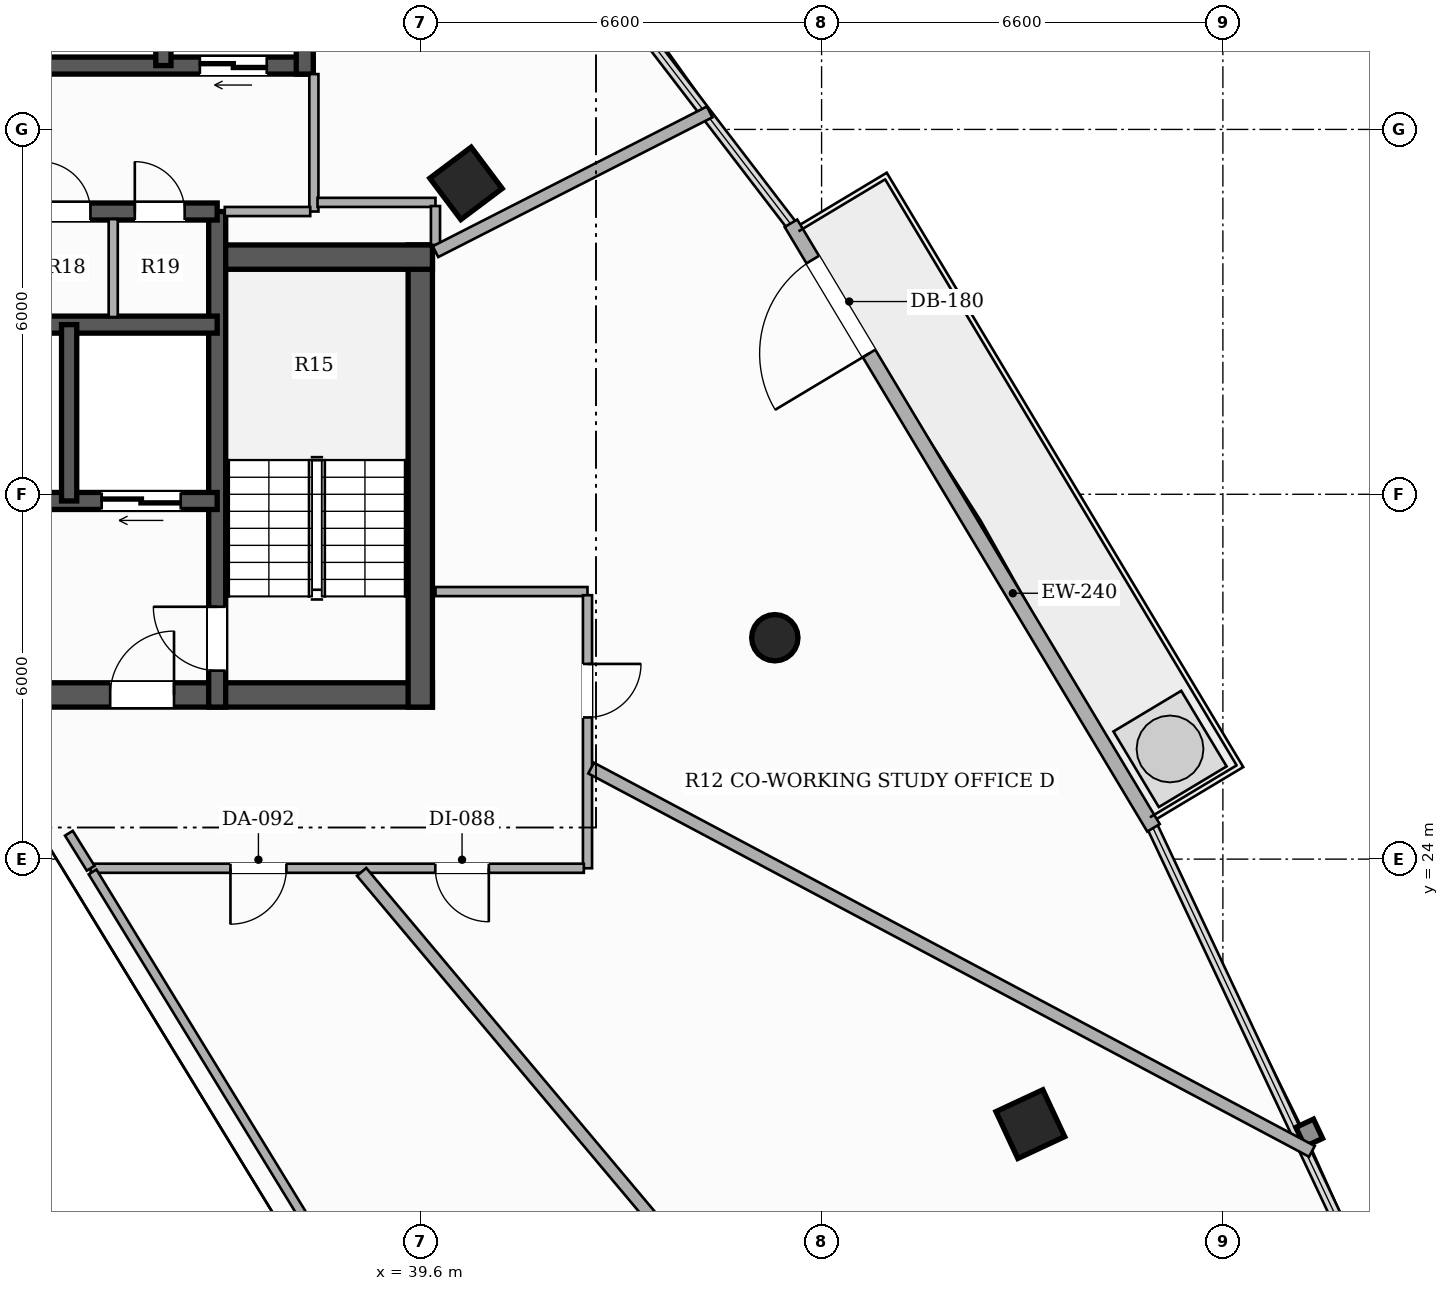
"""IFC4 building model, lengths in metres.
Left out: names, types, materials, properties, quantities, classifications, styles, units other than length and angle.
Written with IfcOpenShell. Run it as: python <this file> out.ifc"""

import sys

from ifc_helpers import new_model, si_unit, direction, frame, frame_2d, origin, origin_2d, place, context, subcontext, project, spatial, rectangle, hollow_rectangle, hollow_circle, extrude, element, fill, save


model = new_model("IFC4")
c1 = context("Model", 3, precision=1e-05, world=origin(), true_north=direction((0.0, 1.0)))
c2 = subcontext(c1, "Body", "Model", "MODEL_VIEW")
j1 = project(units=[si_unit("LENGTHUNIT", "METRE"), si_unit("PLANEANGLEUNIT", "RADIAN")], contexts=[c1])
p1 = place(None, origin())
s1 = spatial("IfcSite", under=j1, at=p1, CompositionType="ELEMENT")
p2 = place(p1, origin())
s2 = spatial("IfcBuilding", under=s1, at=p2, CompositionType="ELEMENT")
p3 = place(p2, frame((0.0, 0.0, 133.1)))
s3 = spatial("IfcBuildingStorey", under=s2, at=p3, CompositionType="ELEMENT", Elevation=133.1)
p4 = place(p3, frame((26.2, 26.7, 0.0), z_axis=(0.0, 0.0, 1.0), x_axis=(1.0, 0.0, 0.0)))
e1 = element("IfcWall", 1, at=p4, inside=s3, PredefinedType="SHEAR", context=c2, shape_type="SweptSolid", body=[
    extrude(rectangle(XDim=13.6, YDim=0.4, at=frame_2d((6.8, 0.0))), origin(), (0.0, 0.0, 1.0), 3.3),
])
p5 = place(p4, frame((4.35, 0.0, 0.0)))
e2 = element("IfcOpeningElement", 2, at=p5, cuts=e1, PredefinedType="OPENING", context=c2, shape_type="SweptSolid", body=[
    extrude(rectangle(XDim=1.05, YDim=2.15, at=frame_2d((0.525, 1.075))), frame((0.0, 0.21, 0.0), z_axis=(0.0, -1.0, 0.0), x_axis=(1.0, 0.0, 0.0)), (0.0, 0.0, 1.0), 0.42),
])
p6 = place(p4, frame((8.3, 0.0, 0.0)))
e3 = element("IfcOpeningElement", 3, at=p6, cuts=e1, PredefinedType="OPENING", context=c2, shape_type="SweptSolid", body=[
    extrude(rectangle(XDim=1.05, YDim=2.15, at=frame_2d((0.525, 1.075))), frame((0.0, 0.21, 0.0), z_axis=(0.0, -1.0, 0.0), x_axis=(1.0, 0.0, 0.0)), (0.0, 0.0, 1.0), 0.42),
])
p7 = place(p3, frame((39.6, 26.5, 0.0), z_axis=(0.0, 0.0, 1.0), x_axis=(0.0, 1.0, 0.0)))
e4 = element("IfcWall", 4, at=p7, inside=s3, PredefinedType="SHEAR", context=c2, shape_type="SweptSolid", body=[
    extrude(rectangle(XDim=7.6, YDim=0.4, at=frame_2d((3.8, 0.0))), origin(), (0.0, 0.0, 1.0), 3.3),
])
p8 = place(p3, frame((36.12, 33.9, 0.0), z_axis=(0.0, 0.0, 1.0), x_axis=(1.0, 0.0, 0.0)))
e5 = element("IfcWall", 5, at=p8, inside=s3, PredefinedType="SHEAR", context=c2, shape_type="SweptSolid", body=[
    extrude(rectangle(XDim=3.68, YDim=0.4, at=frame_2d((1.84, 0.0))), origin(), (0.0, 0.0, 1.0), 3.3),
])
p9 = place(p3, frame((36.26, 26.5, 0.0), z_axis=(0.0, 0.0, 1.0), x_axis=(0.0, 1.0, 0.0)))
e6 = element("IfcWall", 6, at=p9, inside=s3, PredefinedType="SHEAR", context=c2, shape_type="SweptSolid", body=[
    extrude(rectangle(XDim=8.15, YDim=0.28, at=frame_2d((4.075, 0.0))), origin(), (0.0, 0.0, 1.0), 3.3),
])
p10 = place(p9, frame((0.6, 0.0, 0.0)))
e7 = element("IfcOpeningElement", 7, at=p10, cuts=e6, PredefinedType="OPENING", context=c2, shape_type="SweptSolid", body=[
    extrude(rectangle(XDim=1.05, YDim=2.15, at=frame_2d((0.525, 1.075))), frame((0.0, 0.15, 0.0), z_axis=(0.0, -1.0, 0.0), x_axis=(1.0, 0.0, 0.0)), (0.0, 0.0, 1.0), 0.3),
])
p11 = place(p3, frame((36.26, 29.89, 0.0), z_axis=(0.0, 0.0, 1.0), x_axis=(-1.0, 0.0, 0.0)))
e8 = element("IfcWall", 8, at=p11, inside=s3, PredefinedType="SHEAR", context=c2, shape_type="SweptSolid", body=[
    extrude(rectangle(XDim=6.52, YDim=0.28, at=frame_2d((3.26, 0.0))), origin(), (0.0, 0.0, 1.0), 3.3),
])
p12 = place(p11, frame((4.875, 0.0, 0.0)))
e9 = element("IfcOpeningElement", 9, at=p12, cuts=e8, PredefinedType="OPENING", context=c2, shape_type="SweptSolid", body=[
    extrude(rectangle(XDim=1.1, YDim=2.2, at=frame_2d((0.55, 1.1))), frame((0.0, 0.15, 0.0), z_axis=(0.0, -1.0, 0.0), x_axis=(1.0, 0.0, 0.0)), (0.0, 0.0, 1.0), 0.3),
])
p13 = place(p11, frame((2.875, 0.0, 0.0)))
e10 = element("IfcOpeningElement", 10, at=p13, cuts=e8, PredefinedType="OPENING", context=c2, shape_type="SweptSolid", body=[
    extrude(rectangle(XDim=1.1, YDim=2.2, at=frame_2d((0.55, 1.1))), frame((0.0, 0.15, 0.0), z_axis=(0.0, -1.0, 0.0), x_axis=(1.0, 0.0, 0.0)), (0.0, 0.0, 1.0), 0.3),
])
p14 = place(p11, frame((0.6, 0.0, 0.0)))
e11 = element("IfcOpeningElement", 11, at=p14, cuts=e8, PredefinedType="OPENING", context=c2, shape_type="SweptSolid", body=[
    extrude(rectangle(XDim=1.3, YDim=2.2, at=frame_2d((0.65, 1.1))), frame((0.0, 0.15, 0.0), z_axis=(0.0, -1.0, 0.0), x_axis=(1.0, 0.0, 0.0)), (0.0, 0.0, 1.0), 0.3),
])
p15 = place(p3, frame((29.74, 32.79, 0.0), z_axis=(0.0, 0.0, 1.0), x_axis=(1.0, 0.0, 0.0)))
e12 = element("IfcWall", 12, at=p15, inside=s3, PredefinedType="SHEAR", context=c2, shape_type="SweptSolid", body=[
    extrude(rectangle(XDim=6.52, YDim=0.28, at=frame_2d((3.26, 0.0))), origin(), (0.0, 0.0, 1.0), 3.3),
])
p16 = place(p3, frame((33.825, 29.89, 0.0), z_axis=(0.0, 0.0, 1.0), x_axis=(0.0, 1.0, 0.0)))
e13 = element("IfcWall", 13, at=p16, inside=s3, PredefinedType="SHEAR", context=c2, shape_type="SweptSolid", body=[
    extrude(rectangle(XDim=2.9, YDim=0.25, at=frame_2d((1.45, 0.0))), origin(), (0.0, 0.0, 1.0), 3.3),
])
p17 = place(p3, frame((29.74, 34.65, 0.0), z_axis=(0.0, 0.0, 1.0), x_axis=(1.0, 0.0, 0.0)))
e14 = element("IfcWall", 14, at=p17, inside=s3, PredefinedType="SHEAR", context=c2, shape_type="SweptSolid", body=[
    extrude(rectangle(XDim=6.52, YDim=0.28, at=frame_2d((3.26, 0.0))), origin(), (0.0, 0.0, 1.0), 3.3),
])
p18 = place(p17, frame((0.515, 0.0, 0.0)))
e15 = element("IfcOpeningElement", 15, at=p18, cuts=e14, PredefinedType="OPENING", context=c2, shape_type="SweptSolid", body=[
    extrude(rectangle(XDim=0.82, YDim=2.1, at=frame_2d((0.41, 1.05))), frame((0.0, 0.15, 0.0), z_axis=(0.0, -1.0, 0.0), x_axis=(1.0, 0.0, 0.0)), (0.0, 0.0, 1.0), 0.3),
])
p19 = place(p17, frame((2.065, 0.0, 0.0)))
e16 = element("IfcOpeningElement", 16, at=p19, cuts=e14, PredefinedType="OPENING", context=c2, shape_type="SweptSolid", body=[
    extrude(rectangle(XDim=0.82, YDim=2.1, at=frame_2d((0.41, 1.05))), frame((0.0, 0.15, 0.0), z_axis=(0.0, -1.0, 0.0), x_axis=(1.0, 0.0, 0.0)), (0.0, 0.0, 1.0), 0.3),
])
p20 = place(p17, frame((3.615, 0.0, 0.0)))
e17 = element("IfcOpeningElement", 17, at=p20, cuts=e14, PredefinedType="OPENING", context=c2, shape_type="SweptSolid", body=[
    extrude(rectangle(XDim=0.82, YDim=2.1, at=frame_2d((0.41, 1.05))), frame((0.0, 0.15, 0.0), z_axis=(0.0, -1.0, 0.0), x_axis=(1.0, 0.0, 0.0)), (0.0, 0.0, 1.0), 0.3),
])
p21 = place(p17, frame((5.165, 0.0, 0.0)))
e18 = element("IfcOpeningElement", 18, at=p21, cuts=e14, PredefinedType="OPENING", context=c2, shape_type="SweptSolid", body=[
    extrude(rectangle(XDim=0.82, YDim=2.1, at=frame_2d((0.41, 1.05))), frame((0.0, 0.15, 0.0), z_axis=(0.0, -1.0, 0.0), x_axis=(1.0, 0.0, 0.0)), (0.0, 0.0, 1.0), 0.3),
])
p22 = place(p3, frame((37.84, 37.05, 0.0), z_axis=(0.0, 0.0, 1.0), x_axis=(-1.0, 0.0, 0.0)))
e19 = element("IfcWall", 19, at=p22, inside=s3, PredefinedType="SHEAR", context=c2, shape_type="SweptSolid", body=[
    extrude(rectangle(XDim=9.68, YDim=0.28, at=frame_2d((4.84, 0.0))), origin(), (0.0, 0.0, 1.0), 3.3),
])
p23 = place(p22, frame((7.815, 0.0, 0.0)))
e20 = element("IfcOpeningElement", 20, at=p23, cuts=e19, PredefinedType="OPENING", context=c2, shape_type="SweptSolid", body=[
    extrude(rectangle(XDim=1.1, YDim=2.2, at=frame_2d((0.55, 1.1))), frame((0.0, 0.15, 0.0), z_axis=(0.0, -1.0, 0.0), x_axis=(1.0, 0.0, 0.0)), (0.0, 0.0, 1.0), 0.3),
])
p24 = place(p22, frame((0.765, 0.0, 0.0)))
e21 = element("IfcOpeningElement", 21, at=p24, cuts=e19, PredefinedType="OPENING", context=c2, shape_type="SweptSolid", body=[
    extrude(rectangle(XDim=1.1, YDim=2.2, at=frame_2d((0.55, 1.1))), frame((0.0, 0.15, 0.0), z_axis=(0.0, -1.0, 0.0), x_axis=(1.0, 0.0, 0.0)), (0.0, 0.0, 1.0), 0.3),
])
p25 = place(p3, frame((37.7, 36.91, 0.0), z_axis=(0.0, 0.0, 1.0), x_axis=(0.0, 1.0, 0.0)))
e22 = element("IfcWall", 22, at=p25, inside=s3, PredefinedType="SHEAR", context=c2, shape_type="SweptSolid", body=[
    extrude(rectangle(XDim=2.83, YDim=0.28, at=frame_2d((1.415, 0.0))), origin(), (0.0, 0.0, 1.0), 3.3),
])
p26 = place(p3, frame((35.375, 37.05, 0.0), z_axis=(0.0, 0.0, 1.0), x_axis=(0.0, 1.0, 0.0)))
e23 = element("IfcWall", 23, at=p26, inside=s3, PredefinedType="SHEAR", context=c2, shape_type="SweptSolid", body=[
    extrude(rectangle(XDim=2.55, YDim=0.25, at=frame_2d((1.275, 0.0))), origin(), (0.0, 0.0, 1.0), 3.3),
])
p27 = place(p3, frame((49.633, 19.642, 0.0), z_axis=(0.0, 0.0, 1.0), x_axis=(-0.422618261741, 0.906307787037, 0.0)))
e24 = element("IfcColumn", 24, at=p27, inside=s3, PredefinedType="COLUMN", context=c2, shape_type="SweptSolid", body=[
    extrude(hollow_rectangle(XDim=0.85, YDim=0.85, WallThickness=0.028, at=origin_2d()), origin(), (0.0, 0.0, 1.0), 3.3),
])
p28 = place(p3, frame((45.431, 27.641, 0.0), z_axis=(0.0, 0.0, 1.0), x_axis=(1.0, 0.0, 0.0)))
e25 = element("IfcColumn", 25, at=p28, inside=s3, PredefinedType="COLUMN", context=c2, shape_type="SweptSolid", body=[
    extrude(hollow_circle(Radius=0.381, WallThickness=0.022, at=origin_2d()), origin(), (0.0, 0.0, 1.0), 3.3),
])
p29 = place(p3, frame((40.352, 35.113, 0.0), z_axis=(0.0, 0.0, 1.0), x_axis=(-0.600420225326, 0.799684658487, 0.0)))
e26 = element("IfcColumn", 26, at=p29, inside=s3, PredefinedType="COLUMN", context=c2, shape_type="SweptSolid", body=[
    extrude(hollow_rectangle(XDim=0.85, YDim=0.85, WallThickness=0.028, at=origin_2d()), origin(), (0.0, 0.0, 1.0), 3.3),
])
p30 = place(p3, frame((51.659, 24.515, 0.0), z_axis=(0.0, 0.0, 1.0), x_axis=(-0.514343998995, 0.857583961311, 0.0)))
e27 = element("IfcWall", 27, at=p30, inside=s3, PredefinedType="SOLIDWALL", context=c2, shape_type="SweptSolid", body=[
    extrude(rectangle(XDim=11.593, YDim=0.24, at=frame_2d((5.797, 0.0))), origin(), (0.0, 0.0, 1.0), 2.624),
])
p31 = place(p30, frame((9.096, 0.0, 0.0)))
e28 = element("IfcOpeningElement", 28, at=p31, cuts=e27, PredefinedType="OPENING", context=c2, shape_type="SweptSolid", body=[
    extrude(rectangle(XDim=1.8, YDim=2.2, at=frame_2d((0.9, 1.1))), frame((0.0, 0.13, 0.0), z_axis=(0.0, -1.0, 0.0), x_axis=(1.0, 0.0, 0.0)), (0.0, 0.0, 1.0), 0.26),
])
p32 = place(p3, frame((37.85, 34.65, 0.0), z_axis=(0.0, 0.0, 1.0), x_axis=(0.0, 1.0, 0.0)))
e29 = element("IfcWall", 29, at=p32, inside=s3, PredefinedType="PARTITIONING", context=c2, shape_type="SweptSolid", body=[
    extrude(rectangle(XDim=2.26, YDim=0.15, at=frame_2d((1.13, 0.0))), origin(), (0.0, 0.0, 1.0), 3.06),
])
p33 = place(p3, frame((36.385, 34.65, 0.0), z_axis=(0.0, 0.0, 1.0), x_axis=(1.0, 0.0, 0.0)))
e30 = element("IfcWall", 30, at=p33, inside=s3, PredefinedType="PARTITIONING", context=c2, shape_type="SweptSolid", body=[
    extrude(rectangle(XDim=1.405, YDim=0.15, at=frame_2d((0.703, 0.0))), origin(), (0.0, 0.0, 1.0), 2.425),
])
p34 = place(p3, frame((34.55, 32.915, 0.0), z_axis=(0.0, 0.0, 1.0), x_axis=(0.0, 1.0, 0.0)))
e31 = element("IfcWall", 31, at=p34, inside=s3, PredefinedType="PARTITIONING", context=c2, shape_type="SweptSolid", body=[
    extrude(rectangle(XDim=1.61, YDim=0.15, at=frame_2d((0.805, 0.0))), origin(), (0.0, 0.0, 1.0), 3.06),
])
p35 = place(p3, frame((39.85, 28.4, 0.0), z_axis=(0.0, 0.0, 1.0), x_axis=(1.0, 0.0, 0.0)))
e32 = element("IfcWall", 32, at=p35, inside=s3, PredefinedType="PARTITIONING", context=c2, shape_type="SweptSolid", body=[
    extrude(rectangle(XDim=2.5, YDim=0.15, at=frame_2d((1.25, 0.0))), origin(), (0.0, 0.0, 1.0), 2.721),
])
p36 = place(p3, frame((42.35, 28.34, 0.0), z_axis=(0.0, 0.0, 1.0), x_axis=(0.0, -1.0, 0.0)))
e33 = element("IfcWall", 33, at=p36, inside=s3, PredefinedType="PARTITIONING", context=c2, shape_type="SweptSolid", body=[
    extrude(rectangle(XDim=4.49, YDim=0.15, at=frame_2d((2.245, 0.0))), origin(), (0.0, 0.0, 1.0), 2.721),
])
p37 = place(p36, frame((1.13, 0.0, 0.0)))
e34 = element("IfcOpeningElement", 34, at=p37, cuts=e33, PredefinedType="OPENING", context=c2, shape_type="SweptSolid", body=[
    extrude(rectangle(XDim=0.88, YDim=2.1, at=frame_2d((0.44, 1.05))), frame((0.0, 0.085, 0.0), z_axis=(0.0, -1.0, 0.0), x_axis=(1.0, 0.0, 0.0)), (0.0, 0.0, 1.0), 0.17),
])
p38 = place(p3, frame((42.29, 23.85, 0.0), z_axis=(0.0, 0.0, 1.0), x_axis=(-1.0, 0.0, 0.0)))
e35 = element("IfcWall", 35, at=p38, inside=s3, PredefinedType="PARTITIONING", context=c2, shape_type="SweptSolid", body=[
    extrude(rectangle(XDim=8.111, YDim=0.15, at=frame_2d((4.056, 0.0))), origin(), (0.0, 0.0, 1.0), 2.492),
])
p39 = place(p38, frame((1.563, 0.0, 0.0)))
e36 = element("IfcOpeningElement", 36, at=p39, cuts=e35, PredefinedType="OPENING", context=c2, shape_type="SweptSolid", body=[
    extrude(rectangle(XDim=0.88, YDim=2.1, at=frame_2d((0.44, 1.05))), frame((0.0, 0.085, 0.0), z_axis=(0.0, -1.0, 0.0), x_axis=(1.0, 0.0, 0.0)), (0.0, 0.0, 1.0), 0.17),
])
p40 = place(p38, frame((4.892, 0.0, 0.0)))
e37 = element("IfcOpeningElement", 37, at=p40, cuts=e35, PredefinedType="OPENING", context=c2, shape_type="SweptSolid", body=[
    extrude(rectangle(XDim=0.92, YDim=2.15, at=frame_2d((0.46, 1.075))), frame((0.0, 0.085, 0.0), z_axis=(0.0, -1.0, 0.0), x_axis=(1.0, 0.0, 0.0)), (0.0, 0.0, 1.0), 0.17),
])
p41 = place(p3, frame((34.179, 23.85, 0.0), z_axis=(0.0, 0.0, 1.0), x_axis=(-0.527828834635, 0.849350764601, 0.0)))
e38 = element("IfcWall", 38, at=p41, inside=s3, PredefinedType="PARTITIONING", context=c2, shape_type="SweptSolid", body=[
    extrude(rectangle(XDim=0.678, YDim=0.15, at=frame_2d((0.339, 0.0))), origin(), (0.0, 0.0, 1.0), 3.06),
])
p42 = place(p3, frame((37.91, 34.8, 0.0), z_axis=(0.0, 0.0, 1.0), x_axis=(1.0, 0.0, 0.0)))
e39 = element("IfcWall", 39, at=p42, inside=s3, PredefinedType="PARTITIONING", context=c2, shape_type="SweptSolid", body=[
    extrude(rectangle(XDim=1.94, YDim=0.15, at=frame_2d((0.97, 0.0))), origin(), (0.0, 0.0, 1.0), 2.721),
])
p43 = place(p3, frame((39.85, 34.74, 0.0), z_axis=(0.0, 0.0, 1.0), x_axis=(0.0, -1.0, 0.0)))
e40 = element("IfcWall", 40, at=p43, inside=s3, PredefinedType="PARTITIONING", context=c2, shape_type="SweptSolid", body=[
    extrude(rectangle(XDim=0.64, YDim=0.15, at=frame_2d((0.32, 0.0))), origin(), (0.0, 0.0, 1.0), 2.721),
])
p44 = place(p3, frame((34.21, 23.79, 0.0), z_axis=(0.0, 0.0, 1.0), x_axis=(0.521925672495, -0.852990968528, 0.0)))
e41 = element("IfcWall", 41, at=p44, inside=s3, PredefinedType="PARTITIONING", context=c2, shape_type="SweptSolid", body=[
    extrude(rectangle(XDim=8.116, YDim=0.15, at=frame_2d((4.058, 0.0))), origin(), (0.0, 0.0, 1.0), 2.721),
])
p45 = place(p3, frame((54.526, 4.867, 0.0), z_axis=(0.0, 0.0, 1.0), x_axis=(-0.643084567011, 0.765795168222, 0.0)))
e42 = element("IfcWall", 42, at=p45, inside=s3, PredefinedType="PARTITIONING", context=c2, shape_type="SweptSolid", body=[
    extrude(rectangle(XDim=24.71, YDim=0.2, at=frame_2d((12.355, 0.0))), origin(), (0.0, 0.0, 1.0), 2.413),
])
p46 = place(p3, frame((42.41, 25.497, 0.0), z_axis=(0.0, 0.0, 1.0), x_axis=(0.882944726502, -0.46947695358, 0.0)))
e43 = element("IfcWall", 43, at=p46, inside=s3, PredefinedType="PARTITIONING", context=c2, shape_type="SweptSolid", body=[
    extrude(rectangle(XDim=13.426, YDim=0.2, at=frame_2d((6.713, 0.0))), origin(), (0.0, 0.0, 1.0), 2.413),
])
p47 = place(p3, frame((44.359, 36.288, 0.0), z_axis=(0.0, 0.0, 1.0), x_axis=(-0.890946333403, -0.454108611453, 0.0)))
e44 = element("IfcWall", 44, at=p47, inside=s3, PredefinedType="PARTITIONING", context=c2, shape_type="SweptSolid", body=[
    extrude(rectangle(XDim=5.061, YDim=0.2, at=frame_2d((2.53, 0.0))), origin(), (0.0, 0.0, 1.0), 2.413),
])
p48 = place(p31, origin())
e45 = element("IfcDoor", 45, at=p48, inside=s3, OperationType="SINGLE_SWING_LEFT", PredefinedType="DOOR", context=c2, shape_type="SweptSolid", body=[
    extrude(rectangle(XDim=1.8, YDim=2.2, at=frame_2d((0.9, 1.1))), frame((0.0, 0.025, 0.0), z_axis=(0.0, -1.0, 0.0), x_axis=(1.0, 0.0, 0.0)), (0.0, 0.0, 1.0), 0.05),
])
fill(e28, e45)
p49 = place(p10, origin())
e46 = element("IfcDoor", 46, at=p49, inside=s3, OperationType="SINGLE_SWING_RIGHT", PredefinedType="DOOR", context=c2, shape_type="SweptSolid", body=[
    extrude(rectangle(XDim=1.05, YDim=2.15, at=frame_2d((0.525, 1.075))), frame((0.0, 0.025, 0.0), z_axis=(0.0, -1.0, 0.0), x_axis=(1.0, 0.0, 0.0)), (0.0, 0.0, 1.0), 0.05),
])
fill(e7, e46)
p50 = place(p6, origin())
e47 = element("IfcDoor", 47, at=p50, inside=s3, OperationType="SINGLE_SWING_RIGHT", PredefinedType="DOOR", context=c2, shape_type="SweptSolid", body=[
    extrude(rectangle(XDim=1.05, YDim=2.15, at=frame_2d((0.525, 1.075))), frame((0.0, 0.025, 0.0), z_axis=(0.0, -1.0, 0.0), x_axis=(1.0, 0.0, 0.0)), (0.0, 0.0, 1.0), 0.05),
])
fill(e3, e47)
p51 = place(p14, origin())
e48 = element("IfcDoor", 48, at=p51, inside=s3, OperationType="DOUBLE_DOOR_SLIDING", PredefinedType="DOOR", context=c2, shape_type="SweptSolid", body=[
    extrude(rectangle(XDim=1.3, YDim=2.2, at=frame_2d((0.65, 1.1))), frame((0.0, 0.025, 0.0), z_axis=(0.0, -1.0, 0.0), x_axis=(1.0, 0.0, 0.0)), (0.0, 0.0, 1.0), 0.05),
])
fill(e11, e48)
p52 = place(p24, origin())
e49 = element("IfcDoor", 49, at=p52, inside=s3, OperationType="DOUBLE_DOOR_SLIDING", PredefinedType="DOOR", context=c2, shape_type="SweptSolid", body=[
    extrude(rectangle(XDim=1.1, YDim=2.2, at=frame_2d((0.55, 1.1))), frame((0.0, 0.025, 0.0), z_axis=(0.0, -1.0, 0.0), x_axis=(1.0, 0.0, 0.0)), (0.0, 0.0, 1.0), 0.05),
])
fill(e21, e49)
p53 = place(p20, origin())
e50 = element("IfcDoor", 50, at=p53, inside=s3, OperationType="SINGLE_SWING_LEFT", PredefinedType="DOOR", context=c2, shape_type="SweptSolid", body=[
    extrude(rectangle(XDim=0.82, YDim=2.1, at=frame_2d((0.41, 1.05))), frame((0.0, 0.025, 0.0), z_axis=(0.0, -1.0, 0.0), x_axis=(1.0, 0.0, 0.0)), (0.0, 0.0, 1.0), 0.05),
])
fill(e17, e50)
p54 = place(p21, origin())
e51 = element("IfcDoor", 51, at=p54, inside=s3, OperationType="SINGLE_SWING_LEFT", PredefinedType="DOOR", context=c2, shape_type="SweptSolid", body=[
    extrude(rectangle(XDim=0.82, YDim=2.1, at=frame_2d((0.41, 1.05))), frame((0.0, 0.025, 0.0), z_axis=(0.0, -1.0, 0.0), x_axis=(1.0, 0.0, 0.0)), (0.0, 0.0, 1.0), 0.05),
])
fill(e18, e51)
p55 = place(p39, origin())
e52 = element("IfcDoor", 52, at=p55, inside=s3, OperationType="SINGLE_SWING_LEFT", PredefinedType="DOOR", context=c2, shape_type="SweptSolid", body=[
    extrude(rectangle(XDim=0.88, YDim=2.1, at=frame_2d((0.44, 1.05))), frame((0.0, 0.025, 0.0), z_axis=(0.0, -1.0, 0.0), x_axis=(1.0, 0.0, 0.0)), (0.0, 0.0, 1.0), 0.05),
])
fill(e36, e52)
p56 = place(p40, origin())
e53 = element("IfcDoor", 53, at=p56, inside=s3, OperationType="SINGLE_SWING_RIGHT", PredefinedType="DOOR", context=c2, shape_type="SweptSolid", body=[
    extrude(rectangle(XDim=0.92, YDim=2.15, at=frame_2d((0.46, 1.075))), frame((0.0, 0.025, 0.0), z_axis=(0.0, -1.0, 0.0), x_axis=(1.0, 0.0, 0.0)), (0.0, 0.0, 1.0), 0.05),
])
fill(e37, e53)
p57 = place(p37, origin())
e54 = element("IfcDoor", 54, at=p57, inside=s3, OperationType="SINGLE_SWING_LEFT", PredefinedType="DOOR", context=c2, shape_type="SweptSolid", body=[
    extrude(rectangle(XDim=0.88, YDim=2.1, at=frame_2d((0.44, 1.05))), frame((0.0, 0.025, 0.0), z_axis=(0.0, -1.0, 0.0), x_axis=(1.0, 0.0, 0.0)), (0.0, 0.0, 1.0), 0.05),
])
fill(e34, e54)
save(model, sys.argv[1])
